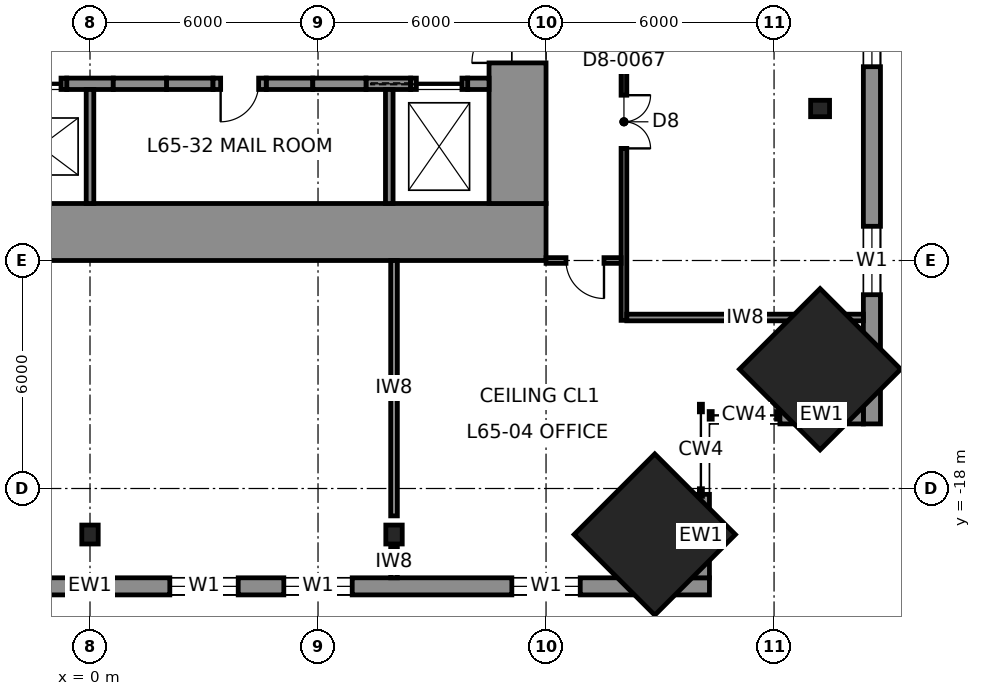
"""IFC4 building model, lengths in metres.
Left out: names, types, materials, properties, quantities, classifications, styles, units other than length and angle.
Written with IfcOpenShell. Run it as: python <this file> out.ifc"""

import sys

from ifc_helpers import new_model, si_unit, direction, frame, frame_2d, origin, origin_2d, place, context, subcontext, project, spatial, rectangle, i_section, extrude, element, fill, save


model = new_model("IFC4")
c1 = context("Model", 3, precision=1e-05, world=origin(), true_north=direction((0.0, 1.0)))
c2 = subcontext(c1, "Body", "Model", "MODEL_VIEW")
j1 = project(units=[si_unit("LENGTHUNIT", "METRE"), si_unit("PLANEANGLEUNIT", "RADIAN")], contexts=[c1])
p1 = place(None, origin())
s1 = spatial("IfcSite", under=j1, at=p1, CompositionType="ELEMENT")
p2 = place(p1, origin())
s2 = spatial("IfcBuilding", under=s1, at=p2, CompositionType="ELEMENT")
p3 = place(p2, frame((0.0, 0.0, 289.8)))
s3 = spatial("IfcBuildingStorey", under=s2, at=p3, CompositionType="ELEMENT", Elevation=289.8)
for number, where, z_axis, x_axis in (
    (1, (19.211, -14.861, 0.0), (-0.04, 0.04, 0.998), (-0.708, -0.707, 0.0)),
    (2, (14.861, -19.211, 0.0), (-0.04, 0.04, 0.998), (-0.707, -0.708, 0.0)),
):
    element("IfcColumn", number, at=place(p3, frame(where, z_axis=z_axis, x_axis=x_axis)), inside=s3, PredefinedType="COLUMN", context=c2, shape_type="SweptSolid", body=[
        extrude(rectangle(XDim=3.0, YDim=3.0, at=origin_2d()), origin(), (0.0, 0.0, 1.0), 4.007),
    ])
for number, where, z_axis, x_axis in (
    (3, (19.211, -8.0, 0.0), (-0.04, 0.0, 0.999), (0.0, -1.0, 0.0)),
    (4, (0.0, -19.211, 0.0), (0.0, 0.04, 0.999), (-1.0, 0.0, 0.0)),
    (5, (8.0, -19.211, 0.0), (0.0, 0.04, 0.999), (-1.0, 0.0, 0.0)),
):
    element("IfcColumn", number, at=place(p3, frame(where, z_axis=z_axis, x_axis=x_axis)), inside=s3, PredefinedType="COLUMN", context=c2, shape_type="SweptSolid", body=[
        extrude(i_section(OverallWidth=0.432, OverallDepth=0.498, WebThickness=0.056, FlangeThickness=0.089, at=origin_2d()), origin(), (0.0, 0.0, 1.0), 4.003),
    ])
p4 = place(p3, frame((12.0, -11.25, 0.0), z_axis=(0.0, 0.0, 1.0), x_axis=(-1.0, 0.0, 0.0)))
e6 = element("IfcWall", 6, at=p4, inside=s3, PredefinedType="SHEAR", context=c2, shape_type="SweptSolid", body=[
    extrude(rectangle(XDim=24.0, YDim=1.5, at=frame_2d((12.0, 0.0))), origin(), (0.0, 0.0, 1.0), 4.0),
])
p5 = place(p3, frame((11.25, 10.5, 0.0), z_axis=(0.0, 0.0, 1.0), x_axis=(0.0, -1.0, 0.0)))
e7 = element("IfcWall", 7, at=p5, inside=s3, PredefinedType="SHEAR", context=c2, shape_type="SweptSolid", body=[
    extrude(rectangle(XDim=21.0, YDim=1.5, at=frame_2d((10.5, 0.0))), origin(), (0.0, 0.0, 1.0), 4.0),
])
p6 = place(p5, frame((3.7, 0.0, 0.0)))
e8 = element("IfcOpeningElement", 8, at=p6, cuts=e7, PredefinedType="OPENING", context=c2, shape_type="SweptSolid", body=[
    extrude(rectangle(XDim=1.2, YDim=2.3, at=frame_2d((0.6, 1.15))), frame((0.0, 0.76, 0.0), z_axis=(0.0, -1.0, 0.0), x_axis=(1.0, 0.0, 0.0)), (0.0, 0.0, 1.0), 1.52),
])
p7 = place(p5, frame((16.1, 0.0, 0.0)))
e9 = element("IfcOpeningElement", 9, at=p7, cuts=e7, PredefinedType="OPENING", context=c2, shape_type="SweptSolid", body=[
    extrude(rectangle(XDim=1.2, YDim=2.3, at=frame_2d((0.6, 1.15))), frame((0.0, 0.76, 0.0), z_axis=(0.0, -1.0, 0.0), x_axis=(1.0, 0.0, 0.0)), (0.0, 0.0, 1.0), 1.52),
])
for number, where, z_axis, x_axis in (
    (10, (-0.613, -7.35, 0.0), (0.0, 0.0, 1.0), (1.0, 0.0, 0.0)),
    (11, (2.012, -7.35, 0.0), (0.0, 0.0, 1.0), (1.0, 0.0, 0.0)),
    (12, (4.637, -7.35, 0.0), (0.0, 0.0, 1.0), (1.0, 0.0, 0.0)),
):
    element("IfcWall", number, at=place(p3, frame(where, z_axis=z_axis, x_axis=x_axis)), inside=s3, PredefinedType="SHEAR", context=c2, shape_type="SweptSolid", body=[
        extrude(rectangle(XDim=1.225, YDim=0.3, at=frame_2d((0.613, 0.0))), origin(), (0.0, 0.0, 1.0), 4.0),
    ])
p8 = place(p3, frame((7.262, -7.35, 0.0), z_axis=(0.0, 0.0, 1.0), x_axis=(1.0, 0.0, 0.0)))
e13 = element("IfcWall", 13, at=p8, inside=s3, PredefinedType="SHEAR", context=c2, shape_type="SweptSolid", body=[
    extrude(rectangle(XDim=1.175, YDim=0.3, at=frame_2d((0.587, 0.0))), origin(), (0.0, 0.0, 1.0), 4.0),
])
p9 = place(p3, frame((9.938, -7.35, 0.0), z_axis=(0.0, 0.0, 1.0), x_axis=(1.0, 0.0, 0.0)))
e14 = element("IfcWall", 14, at=p9, inside=s3, PredefinedType="SHEAR", context=c2, shape_type="SweptSolid", body=[
    extrude(rectangle(XDim=0.562, YDim=0.3, at=frame_2d((0.281, 0.0))), origin(), (0.0, 0.0, 1.0), 4.0),
])
p10 = place(p3, frame((-2.012, -7.35, 0.0), z_axis=(0.0, 0.0, 1.0), x_axis=(1.0, 0.0, 0.0)))
e15 = element("IfcWall", 15, at=p10, inside=s3, PredefinedType="PARTITIONING", context=c2, shape_type="SweptSolid", body=[
    extrude(rectangle(XDim=1.4, YDim=0.3, at=frame_2d((0.7, 0.0))), origin(), (0.0, 0.0, 1.0), 4.0),
])
p11 = place(p10, frame((0.15, 0.0, 0.0)))
e16 = element("IfcOpeningElement", 16, at=p11, cuts=e15, PredefinedType="OPENING", context=c2, shape_type="SweptSolid", body=[
    extrude(rectangle(XDim=1.1, YDim=2.3, at=frame_2d((0.55, 1.15))), frame((0.0, 0.16, 0.0), z_axis=(0.0, -1.0, 0.0), x_axis=(1.0, 0.0, 0.0)), (0.0, 0.0, 1.0), 0.32),
])
p12 = place(p3, frame((0.613, -7.35, 0.0), z_axis=(0.0, 0.0, 1.0), x_axis=(1.0, 0.0, 0.0)))
e17 = element("IfcWall", 17, at=p12, inside=s3, PredefinedType="PARTITIONING", context=c2, shape_type="SweptSolid", body=[
    extrude(rectangle(XDim=1.4, YDim=0.3, at=frame_2d((0.7, 0.0))), origin(), (0.0, 0.0, 1.0), 4.0),
])
p13 = place(p3, frame((3.238, -7.35, 0.0), z_axis=(0.0, 0.0, 1.0), x_axis=(1.0, 0.0, 0.0)))
e18 = element("IfcWall", 18, at=p13, inside=s3, PredefinedType="PARTITIONING", context=c2, shape_type="SweptSolid", body=[
    extrude(rectangle(XDim=1.4, YDim=0.3, at=frame_2d((0.7, 0.0))), origin(), (0.0, 0.0, 1.0), 4.0),
])
p14 = place(p13, frame((0.2, 0.0, 0.0)))
e19 = element("IfcOpeningElement", 19, at=p14, cuts=e18, PredefinedType="OPENING", context=c2, shape_type="SweptSolid", body=[
    extrude(rectangle(XDim=1.0, YDim=2.3, at=frame_2d((0.5, 1.15))), frame((0.0, 0.16, 0.0), z_axis=(0.0, -1.0, 0.0), x_axis=(1.0, 0.0, 0.0)), (0.0, 0.0, 1.0), 0.32),
])
p15 = place(p3, frame((5.863, -7.35, 0.0), z_axis=(0.0, 0.0, 1.0), x_axis=(1.0, 0.0, 0.0)))
e20 = element("IfcWall", 20, at=p15, inside=s3, PredefinedType="PARTITIONING", context=c2, shape_type="SweptSolid", body=[
    extrude(rectangle(XDim=1.4, YDim=0.3, at=frame_2d((0.7, 0.0))), origin(), (0.0, 0.0, 1.0), 4.0),
])
p16 = place(p3, frame((8.438, -7.35, 0.0), z_axis=(0.0, 0.0, 1.0), x_axis=(1.0, 0.0, 0.0)))
e21 = element("IfcWall", 21, at=p16, inside=s3, PredefinedType="PARTITIONING", context=c2, shape_type="SweptSolid", body=[
    extrude(rectangle(XDim=1.5, YDim=0.3, at=frame_2d((0.75, 0.0))), origin(), (0.0, 0.0, 1.0), 4.0),
])
p17 = place(p16, frame((0.15, 0.0, 0.0)))
e22 = element("IfcOpeningElement", 22, at=p17, cuts=e21, PredefinedType="OPENING", context=c2, shape_type="SweptSolid", body=[
    extrude(rectangle(XDim=1.2, YDim=2.3, at=frame_2d((0.6, 1.15))), frame((0.0, 0.16, 0.0), z_axis=(0.0, -1.0, 0.0), x_axis=(1.0, 0.0, 0.0)), (0.0, 0.0, 1.0), 0.32),
])
for number, where, z_axis, x_axis in (
    (23, (0.0, -10.5, 0.0), (0.0, 0.0, 1.0), (0.0, 1.0, 0.0)),
    (24, (7.875, -10.5, 0.0), (0.0, 0.0, 1.0), (0.0, 1.0, 0.0)),
):
    element("IfcWall", number, at=place(p3, frame(where, z_axis=z_axis, x_axis=x_axis)), inside=s3, PredefinedType="PARTITIONING", context=c2, shape_type="SweptSolid", body=[
        extrude(rectangle(XDim=3.0, YDim=0.2, at=frame_2d((1.5, 0.0))), origin(), (0.0, 0.0, 1.0), 4.0),
    ])
p18 = place(p3, frame((20.575, -16.3, 0.0), z_axis=(0.0, 0.0, 1.0), x_axis=(0.0, 1.0, 0.0)))
e25 = element("IfcWall", 25, at=p18, inside=s3, PredefinedType="SOLIDWALL", context=c2, shape_type="SweptSolid", body=[
    extrude(rectangle(XDim=32.6, YDim=0.45, at=frame_2d((16.3, 0.0))), origin(), (0.0, 0.0, 1.0), 3.83),
])
p19 = place(p18, frame((3.4, 0.0, 0.7)))
e26 = element("IfcOpeningElement", 26, at=p19, cuts=e25, PredefinedType="OPENING", context=c2, shape_type="SweptSolid", body=[
    extrude(rectangle(XDim=1.8, YDim=2.6, at=frame_2d((0.9, 1.3))), frame((0.0, 0.235, 0.0), z_axis=(0.0, -1.0, 0.0), x_axis=(1.0, 0.0, 0.0)), (0.0, 0.0, 1.0), 0.47),
])
p20 = place(p18, frame((9.4, 0.0, 0.7)))
e27 = element("IfcOpeningElement", 27, at=p20, cuts=e25, PredefinedType="OPENING", context=c2, shape_type="SweptSolid", body=[
    extrude(rectangle(XDim=1.8, YDim=2.6, at=frame_2d((0.9, 1.3))), frame((0.0, 0.235, 0.0), z_axis=(0.0, -1.0, 0.0), x_axis=(1.0, 0.0, 0.0)), (0.0, 0.0, 1.0), 0.47),
])
p21 = place(p18, frame((12.4, 0.0, 0.7)))
e28 = element("IfcOpeningElement", 28, at=p21, cuts=e25, PredefinedType="OPENING", context=c2, shape_type="SweptSolid", body=[
    extrude(rectangle(XDim=1.8, YDim=2.6, at=frame_2d((0.9, 1.3))), frame((0.0, 0.235, 0.0), z_axis=(0.0, -1.0, 0.0), x_axis=(1.0, 0.0, 0.0)), (0.0, 0.0, 1.0), 0.47),
])
p22 = place(p18, frame((18.4, 0.0, 0.7)))
e29 = element("IfcOpeningElement", 29, at=p22, cuts=e25, PredefinedType="OPENING", context=c2, shape_type="SweptSolid", body=[
    extrude(rectangle(XDim=1.8, YDim=2.6, at=frame_2d((0.9, 1.3))), frame((0.0, 0.235, 0.0), z_axis=(0.0, -1.0, 0.0), x_axis=(1.0, 0.0, 0.0)), (0.0, 0.0, 1.0), 0.47),
])
p23 = place(p18, frame((21.4, 0.0, 0.7)))
e30 = element("IfcOpeningElement", 30, at=p23, cuts=e25, PredefinedType="OPENING", context=c2, shape_type="SweptSolid", body=[
    extrude(rectangle(XDim=1.8, YDim=2.6, at=frame_2d((0.9, 1.3))), frame((0.0, 0.235, 0.0), z_axis=(0.0, -1.0, 0.0), x_axis=(1.0, 0.0, 0.0)), (0.0, 0.0, 1.0), 0.47),
])
p24 = place(p18, frame((27.4, 0.0, 0.7)))
e31 = element("IfcOpeningElement", 31, at=p24, cuts=e25, PredefinedType="OPENING", context=c2, shape_type="SweptSolid", body=[
    extrude(rectangle(XDim=1.8, YDim=2.6, at=frame_2d((0.9, 1.3))), frame((0.0, 0.235, 0.0), z_axis=(0.0, -1.0, 0.0), x_axis=(1.0, 0.0, 0.0)), (0.0, 0.0, 1.0), 0.47),
])
p25 = place(p3, frame((-16.3, -20.575, 0.0), z_axis=(0.0, 0.0, 1.0), x_axis=(1.0, 0.0, 0.0)))
e32 = element("IfcWall", 32, at=p25, inside=s3, PredefinedType="SOLIDWALL", context=c2, shape_type="SweptSolid", body=[
    extrude(rectangle(XDim=32.6, YDim=0.45, at=frame_2d((16.3, 0.0))), origin(), (0.0, 0.0, 1.0), 3.83),
])
p26 = place(p25, frame((3.4, 0.0, 0.7)))
e33 = element("IfcOpeningElement", 33, at=p26, cuts=e32, PredefinedType="OPENING", context=c2, shape_type="SweptSolid", body=[
    extrude(rectangle(XDim=1.8, YDim=2.6, at=frame_2d((0.9, 1.3))), frame((0.0, 0.235, 0.0), z_axis=(0.0, -1.0, 0.0), x_axis=(1.0, 0.0, 0.0)), (0.0, 0.0, 1.0), 0.47),
])
p27 = place(p25, frame((9.4, 0.0, 0.7)))
e34 = element("IfcOpeningElement", 34, at=p27, cuts=e32, PredefinedType="OPENING", context=c2, shape_type="SweptSolid", body=[
    extrude(rectangle(XDim=1.8, YDim=2.6, at=frame_2d((0.9, 1.3))), frame((0.0, 0.235, 0.0), z_axis=(0.0, -1.0, 0.0), x_axis=(1.0, 0.0, 0.0)), (0.0, 0.0, 1.0), 0.47),
])
p28 = place(p25, frame((12.4, 0.0, 0.7)))
e35 = element("IfcOpeningElement", 35, at=p28, cuts=e32, PredefinedType="OPENING", context=c2, shape_type="SweptSolid", body=[
    extrude(rectangle(XDim=1.8, YDim=2.6, at=frame_2d((0.9, 1.3))), frame((0.0, 0.235, 0.0), z_axis=(0.0, -1.0, 0.0), x_axis=(1.0, 0.0, 0.0)), (0.0, 0.0, 1.0), 0.47),
])
p29 = place(p25, frame((18.4, 0.0, 0.7)))
e36 = element("IfcOpeningElement", 36, at=p29, cuts=e32, PredefinedType="OPENING", context=c2, shape_type="SweptSolid", body=[
    extrude(rectangle(XDim=1.8, YDim=2.6, at=frame_2d((0.9, 1.3))), frame((0.0, 0.235, 0.0), z_axis=(0.0, -1.0, 0.0), x_axis=(1.0, 0.0, 0.0)), (0.0, 0.0, 1.0), 0.47),
])
p30 = place(p25, frame((21.4, 0.0, 0.7)))
e37 = element("IfcOpeningElement", 37, at=p30, cuts=e32, PredefinedType="OPENING", context=c2, shape_type="SweptSolid", body=[
    extrude(rectangle(XDim=1.8, YDim=2.6, at=frame_2d((0.9, 1.3))), frame((0.0, 0.235, 0.0), z_axis=(0.0, -1.0, 0.0), x_axis=(1.0, 0.0, 0.0)), (0.0, 0.0, 1.0), 0.47),
])
p31 = place(p25, frame((27.4, 0.0, 0.7)))
e38 = element("IfcOpeningElement", 38, at=p31, cuts=e32, PredefinedType="OPENING", context=c2, shape_type="SweptSolid", body=[
    extrude(rectangle(XDim=1.8, YDim=2.6, at=frame_2d((0.9, 1.3))), frame((0.0, 0.235, 0.0), z_axis=(0.0, -1.0, 0.0), x_axis=(1.0, 0.0, 0.0)), (0.0, 0.0, 1.0), 0.47),
])
for number, where, z_axis, x_axis in (
    (39, (16.075, -18.154, 0.0), (0.0, 0.0, 1.0), (0.0, -1.0, 0.0)),
    (40, (18.154, -16.075, 0.0), (0.0, 0.0, 1.0), (1.0, 0.0, 0.0)),
):
    element("IfcWall", number, at=place(p3, frame(where, z_axis=z_axis, x_axis=x_axis)), inside=s3, PredefinedType="SOLIDWALL", context=c2, shape_type="SweptSolid", body=[
        extrude(rectangle(XDim=2.197, YDim=0.45, at=frame_2d((1.098, 0.0))), origin(), (0.0, 0.0, 1.0), 3.83),
    ])
p32 = place(p3, frame((14.05, -13.575, 0.0), z_axis=(0.0, 0.0, 1.0), x_axis=(0.0, 1.0, 0.0)))
e41 = element("IfcWall", 41, at=p32, inside=s3, PredefinedType="PARTITIONING", context=c2, shape_type="SweptSolid", body=[
    extrude(rectangle(XDim=27.15, YDim=0.15, at=frame_2d((13.575, 0.0))), origin(), (0.0, 0.0, 1.0), 3.83),
])
p33 = place(p32, frame((4.525, 0.0, 0.0)))
e42 = element("IfcOpeningElement", 42, at=p33, cuts=e41, PredefinedType="OPENING", context=c2, shape_type="SweptSolid", body=[
    extrude(rectangle(XDim=1.4, YDim=2.3, at=frame_2d((0.7, 1.15))), frame((0.0, 0.085, 0.0), z_axis=(0.0, -1.0, 0.0), x_axis=(1.0, 0.0, 0.0)), (0.0, 0.0, 1.0), 0.17),
])
p34 = place(p32, frame((9.825, 0.0, 0.0)))
e43 = element("IfcOpeningElement", 43, at=p34, cuts=e41, PredefinedType="OPENING", context=c2, shape_type="SweptSolid", body=[
    extrude(rectangle(XDim=1.0, YDim=2.3, at=frame_2d((0.5, 1.15))), frame((0.0, 0.085, 0.0), z_axis=(0.0, -1.0, 0.0), x_axis=(1.0, 0.0, 0.0)), (0.0, 0.0, 1.0), 0.17),
])
p35 = place(p32, frame((16.575, 0.0, 0.0)))
e44 = element("IfcOpeningElement", 44, at=p35, cuts=e41, PredefinedType="OPENING", context=c2, shape_type="SweptSolid", body=[
    extrude(rectangle(XDim=1.0, YDim=2.3, at=frame_2d((0.5, 1.15))), frame((0.0, 0.085, 0.0), z_axis=(0.0, -1.0, 0.0), x_axis=(1.0, 0.0, 0.0)), (0.0, 0.0, 1.0), 0.17),
])
p36 = place(p3, frame((13.975, -12.0, 0.0), z_axis=(0.0, 0.0, 1.0), x_axis=(-1.0, 0.0, 0.0)))
e45 = element("IfcWall", 45, at=p36, inside=s3, PredefinedType="PARTITIONING", context=c2, shape_type="SweptSolid", body=[
    extrude(rectangle(XDim=1.975, YDim=0.15, at=frame_2d((0.988, 0.0))), origin(), (0.0, 0.0, 1.0), 3.83),
])
p37 = place(p36, frame((0.45, 0.0, 0.0)))
e46 = element("IfcOpeningElement", 46, at=p37, cuts=e45, PredefinedType="OPENING", context=c2, shape_type="SweptSolid", body=[
    extrude(rectangle(XDim=1.0, YDim=2.3, at=frame_2d((0.5, 1.15))), frame((0.0, 0.085, 0.0), z_axis=(0.0, -1.0, 0.0), x_axis=(1.0, 0.0, 0.0)), (0.0, 0.0, 1.0), 0.17),
])
p38 = place(p3, frame((20.35, -13.5, 0.0), z_axis=(0.0, 0.0, 1.0), x_axis=(-1.0, 0.0, 0.0)))
e47 = element("IfcWall", 47, at=p38, inside=s3, PredefinedType="PARTITIONING", context=c2, shape_type="SweptSolid", body=[
    extrude(rectangle(XDim=6.225, YDim=0.175, at=frame_2d((3.113, 0.0))), origin(), (0.0, 0.0, 1.0), 3.83),
])
p39 = place(p3, frame((8.0, -12.0, 0.0), z_axis=(0.0, 0.0, 1.0), x_axis=(0.0, -1.0, 0.0)))
e48 = element("IfcWall", 48, at=p39, inside=s3, PredefinedType="PARTITIONING", context=c2, shape_type="SweptSolid", body=[
    extrude(rectangle(XDim=6.72, YDim=0.175, at=frame_2d((3.36, 0.0))), origin(), (0.0, 0.0, 1.0), 3.016),
])
p40 = place(p3, frame((8.0, -19.541, 0.0), z_axis=(0.0, 0.0, 1.0), x_axis=(0.0, -1.0, 0.0)))
e49 = element("IfcWall", 49, at=p40, inside=s3, PredefinedType="PARTITIONING", context=c2, shape_type="SweptSolid", body=[
    extrude(rectangle(XDim=0.809, YDim=0.175, at=frame_2d((0.405, 0.0))), origin(), (0.0, 0.0, 1.0), 3.83),
])
p41 = place(p19, origin())
e50 = element("IfcWindow", 50, at=p41, inside=s3, PartitioningType="SINGLE_PANEL", PredefinedType="WINDOW", context=c2, shape_type="SweptSolid", body=[
    extrude(rectangle(XDim=1.8, YDim=2.6, at=frame_2d((0.9, 1.3))), frame((0.0, 0.03, 0.0), z_axis=(0.0, -1.0, 0.0), x_axis=(1.0, 0.0, 0.0)), (0.0, 0.0, 1.0), 0.06),
])
fill(e26, e50)
p42 = place(p20, origin())
e51 = element("IfcWindow", 51, at=p42, inside=s3, PartitioningType="SINGLE_PANEL", PredefinedType="WINDOW", context=c2, shape_type="SweptSolid", body=[
    extrude(rectangle(XDim=1.8, YDim=2.6, at=frame_2d((0.9, 1.3))), frame((0.0, 0.03, 0.0), z_axis=(0.0, -1.0, 0.0), x_axis=(1.0, 0.0, 0.0)), (0.0, 0.0, 1.0), 0.06),
])
fill(e27, e51)
p43 = place(p29, origin())
e52 = element("IfcWindow", 52, at=p43, inside=s3, PartitioningType="SINGLE_PANEL", PredefinedType="WINDOW", context=c2, shape_type="SweptSolid", body=[
    extrude(rectangle(XDim=1.8, YDim=2.6, at=frame_2d((0.9, 1.3))), frame((0.0, 0.03, 0.0), z_axis=(0.0, -1.0, 0.0), x_axis=(1.0, 0.0, 0.0)), (0.0, 0.0, 1.0), 0.06),
])
fill(e36, e52)
p44 = place(p30, origin())
e53 = element("IfcWindow", 53, at=p44, inside=s3, PartitioningType="SINGLE_PANEL", PredefinedType="WINDOW", context=c2, shape_type="SweptSolid", body=[
    extrude(rectangle(XDim=1.8, YDim=2.6, at=frame_2d((0.9, 1.3))), frame((0.0, 0.03, 0.0), z_axis=(0.0, -1.0, 0.0), x_axis=(1.0, 0.0, 0.0)), (0.0, 0.0, 1.0), 0.06),
])
fill(e37, e53)
p45 = place(p31, origin())
e54 = element("IfcWindow", 54, at=p45, inside=s3, PartitioningType="SINGLE_PANEL", PredefinedType="WINDOW", context=c2, shape_type="SweptSolid", body=[
    extrude(rectangle(XDim=1.8, YDim=2.6, at=frame_2d((0.9, 1.3))), frame((0.0, 0.03, 0.0), z_axis=(0.0, -1.0, 0.0), x_axis=(1.0, 0.0, 0.0)), (0.0, 0.0, 1.0), 0.06),
])
fill(e38, e54)
p46 = place(p37, origin())
e55 = element("IfcDoor", 55, at=p46, inside=s3, OperationType="SINGLE_SWING_LEFT", PredefinedType="DOOR", context=c2, shape_type="SweptSolid", body=[
    extrude(rectangle(XDim=1.0, YDim=2.3, at=frame_2d((0.5, 1.15))), frame((0.0, 0.025, 0.0), z_axis=(0.0, -1.0, 0.0), x_axis=(1.0, 0.0, 0.0)), (0.0, 0.0, 1.0), 0.05),
])
fill(e46, e55)
p47 = place(p33, frame((1.4, 0.0, 0.0), z_axis=(0.0, 0.0, 1.0), x_axis=(-1.0, 0.0, 0.0)))
e56 = element("IfcDoor", 56, at=p47, inside=s3, OperationType="DOUBLE_DOOR_SINGLE_SWING", PredefinedType="DOOR", context=c2, shape_type="SweptSolid", body=[
    extrude(rectangle(XDim=1.4, YDim=2.3, at=frame_2d((0.7, 1.15))), frame((0.0, 0.025, 0.0), z_axis=(0.0, -1.0, 0.0), x_axis=(1.0, 0.0, 0.0)), (0.0, 0.0, 1.0), 0.05),
])
fill(e42, e56)
p48 = place(p14, frame((1.0, 0.0, 0.0), z_axis=(0.0, 0.0, 1.0), x_axis=(-1.0, 0.0, 0.0)))
e57 = element("IfcDoor", 57, at=p48, inside=s3, OperationType="SINGLE_SWING_RIGHT", PredefinedType="DOOR", context=c2, shape_type="SweptSolid", body=[
    extrude(rectangle(XDim=1.0, YDim=2.3, at=frame_2d((0.5, 1.15))), frame((0.0, 0.025, 0.0), z_axis=(0.0, -1.0, 0.0), x_axis=(1.0, 0.0, 0.0)), (0.0, 0.0, 1.0), 0.05),
])
fill(e19, e57)
p49 = place(p7, frame((1.2, 0.0, 0.0), z_axis=(0.0, 0.0, 1.0), x_axis=(-1.0, 0.0, 0.0)))
e58 = element("IfcDoor", 58, at=p49, inside=s3, OperationType="SINGLE_SWING_LEFT", PredefinedType="DOOR", context=c2, shape_type="SweptSolid", body=[
    extrude(rectangle(XDim=1.2, YDim=2.3, at=frame_2d((0.6, 1.15))), frame((0.0, 0.025, 0.0), z_axis=(0.0, -1.0, 0.0), x_axis=(1.0, 0.0, 0.0)), (0.0, 0.0, 1.0), 0.05),
])
fill(e9, e58)
p50 = place(p17, origin())
e59 = element("IfcDoor", 59, at=p50, inside=s3, OperationType="SLIDING_TO_LEFT", PredefinedType="DOOR", context=c2, shape_type="SweptSolid", body=[
    extrude(rectangle(XDim=1.2, YDim=2.3, at=frame_2d((0.6, 1.15))), frame((0.0, 0.025, 0.0), z_axis=(0.0, -1.0, 0.0), x_axis=(1.0, 0.0, 0.0)), (0.0, 0.0, 1.0), 0.05),
])
fill(e22, e59)
p51 = place(p11, origin())
e60 = element("IfcDoor", 60, at=p51, inside=s3, OperationType="SLIDING_TO_LEFT", PredefinedType="DOOR", context=c2, shape_type="SweptSolid", body=[
    extrude(rectangle(XDim=1.1, YDim=2.3, at=frame_2d((0.55, 1.15))), frame((0.0, 0.025, 0.0), z_axis=(0.0, -1.0, 0.0), x_axis=(1.0, 0.0, 0.0)), (0.0, 0.0, 1.0), 0.05),
])
fill(e16, e60)
save(model, sys.argv[1])
